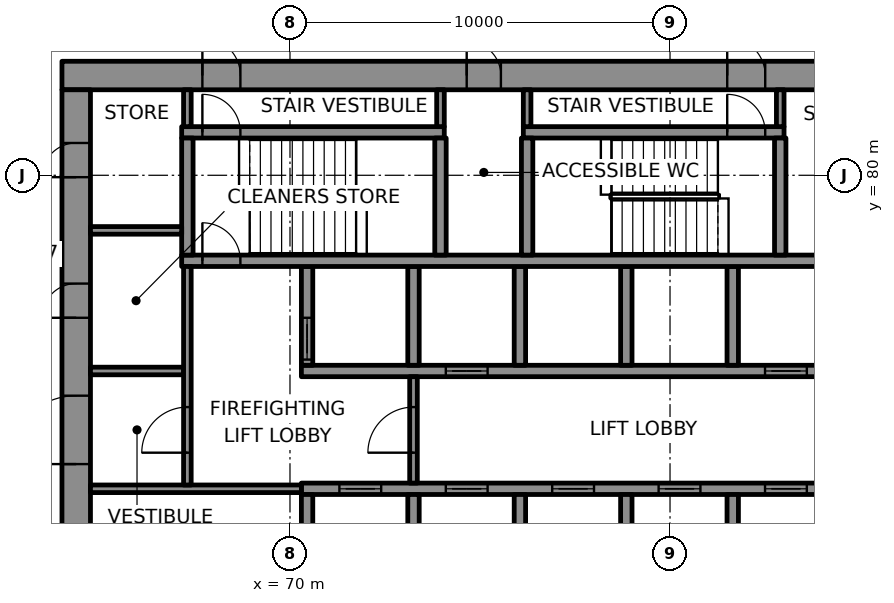
"""IFC4 building model, lengths in metres.
Left out: names, types, materials, properties, quantities, classifications, styles, units other than length and angle.
Written with IfcOpenShell. Run it as: python <this file> out.ifc"""

import sys

from ifc_helpers import new_model, si_unit, direction, frame, frame_2d, origin, place, context, subcontext, project, spatial, rectangle, extrude, element, fill, save


model = new_model("IFC4")
c1 = context("Model", 3, precision=1e-05, world=origin(), true_north=direction((0.0, 1.0)))
c2 = subcontext(c1, "Body", "Model", "MODEL_VIEW")
j1 = project(units=[si_unit("LENGTHUNIT", "METRE"), si_unit("PLANEANGLEUNIT", "RADIAN")], contexts=[c1])
p1 = place(None, origin())
s1 = spatial("IfcSite", under=j1, at=p1, CompositionType="ELEMENT")
p2 = place(p1, origin())
s2 = spatial("IfcBuilding", under=s1, at=p2, CompositionType="ELEMENT")
p3 = place(p2, frame((0.0, 0.0, 194.8)))
s3 = spatial("IfcBuildingStorey", under=s2, at=p3, CompositionType="ELEMENT", Elevation=194.8)
p4 = place(p3, frame((64.0, 82.625, 0.0), z_axis=(0.0, 0.0, 1.0), x_axis=(1.0, 0.0, 0.0)))
e1 = element("IfcWall", 1, at=p4, inside=s3, PredefinedType="SHEAR", context=c2, shape_type="SweptSolid", body=[
    extrude(rectangle(XDim=22.0, YDim=0.75, at=frame_2d((11.0, 0.0))), origin(), (0.0, 0.0, 1.0), 3.7),
])
p5 = place(p4, frame((3.695, 0.0, 0.0)))
e2 = element("IfcOpeningElement", 2, at=p5, cuts=e1, PredefinedType="OPENING", context=c2, shape_type="SweptSolid", body=[
    extrude(rectangle(XDim=1.0, YDim=2.1, at=frame_2d((0.5, 1.05))), frame((0.0, 0.385, 0.0), z_axis=(0.0, -1.0, 0.0), x_axis=(1.0, 0.0, 0.0)), (0.0, 0.0, 1.0), 0.77),
])
p6 = place(p4, frame((17.505, 0.0, 0.0)))
e3 = element("IfcOpeningElement", 3, at=p6, cuts=e1, PredefinedType="OPENING", context=c2, shape_type="SweptSolid", body=[
    extrude(rectangle(XDim=1.0, YDim=2.1, at=frame_2d((0.5, 1.05))), frame((0.0, 0.385, 0.0), z_axis=(0.0, -1.0, 0.0), x_axis=(1.0, 0.0, 0.0)), (0.0, 0.0, 1.0), 0.77),
])
p7 = place(p4, frame((10.65, 0.0, 0.0)))
e4 = element("IfcOpeningElement", 4, at=p7, cuts=e1, PredefinedType="OPENING", context=c2, shape_type="SweptSolid", body=[
    extrude(rectangle(XDim=0.9, YDim=2.1, at=frame_2d((0.45, 1.05))), frame((0.0, 0.385, 0.0), z_axis=(0.0, -1.0, 0.0), x_axis=(1.0, 0.0, 0.0)), (0.0, 0.0, 1.0), 0.77),
])
p8 = place(p3, frame((64.375, 67.75, 0.0), z_axis=(0.0, 0.0, 1.0), x_axis=(0.0, 1.0, 0.0)))
e5 = element("IfcWall", 5, at=p8, inside=s3, PredefinedType="SHEAR", context=c2, shape_type="SweptSolid", body=[
    extrude(rectangle(XDim=14.5, YDim=0.75, at=frame_2d((7.25, 0.0))), origin(), (0.0, 0.0, 1.0), 3.7),
])
p9 = place(p8, frame((4.65, 0.0, 0.0)))
e6 = element("IfcOpeningElement", 6, at=p9, cuts=e5, PredefinedType="OPENING", context=c2, shape_type="SweptSolid", body=[
    extrude(rectangle(XDim=1.8, YDim=2.1, at=frame_2d((0.9, 1.05))), frame((0.0, 0.385, 0.0), z_axis=(0.0, -1.0, 0.0), x_axis=(1.0, 0.0, 0.0)), (0.0, 0.0, 1.0), 0.77),
])
p10 = place(p8, frame((8.5, 0.0, 0.0)))
e7 = element("IfcOpeningElement", 7, at=p10, cuts=e5, PredefinedType="OPENING", context=c2, shape_type="SweptSolid", body=[
    extrude(rectangle(XDim=0.9, YDim=2.1, at=frame_2d((0.45, 1.05))), frame((0.0, 0.385, 0.0), z_axis=(0.0, -1.0, 0.0), x_axis=(1.0, 0.0, 0.0)), (0.0, 0.0, 1.0), 0.77),
])
p11 = place(p8, frame((12.2, 0.0, 0.0)))
e8 = element("IfcOpeningElement", 8, at=p11, cuts=e5, PredefinedType="OPENING", context=c2, shape_type="SweptSolid", body=[
    extrude(rectangle(XDim=0.9, YDim=2.1, at=frame_2d((0.45, 1.05))), frame((0.0, 0.385, 0.0), z_axis=(0.0, -1.0, 0.0), x_axis=(1.0, 0.0, 0.0)), (0.0, 0.0, 1.0), 0.77),
])
p12 = place(p3, frame((70.3, 71.75, 0.0), z_axis=(0.0, 0.0, 1.0), x_axis=(1.0, 0.0, 0.0)))
e9 = element("IfcWall", 9, at=p12, inside=s3, PredefinedType="SHEAR", context=c2, shape_type="SweptSolid", body=[
    extrude(rectangle(XDim=14.3, YDim=0.3, at=frame_2d((7.15, 0.0))), origin(), (0.0, 0.0, 1.0), 3.7),
])
p13 = place(p12, frame((1.0, 0.0, 0.0)))
e10 = element("IfcOpeningElement", 10, at=p13, cuts=e9, PredefinedType="OPENING", context=c2, shape_type="SweptSolid", body=[
    extrude(rectangle(XDim=1.1, YDim=2.1, at=frame_2d((0.55, 1.05))), frame((0.0, 0.16, 0.0), z_axis=(0.0, -1.0, 0.0), x_axis=(1.0, 0.0, 0.0)), (0.0, 0.0, 1.0), 0.32),
])
p14 = place(p12, frame((3.8, 0.0, 0.0)))
e11 = element("IfcOpeningElement", 11, at=p14, cuts=e9, PredefinedType="OPENING", context=c2, shape_type="SweptSolid", body=[
    extrude(rectangle(XDim=1.1, YDim=2.1, at=frame_2d((0.55, 1.05))), frame((0.0, 0.16, 0.0), z_axis=(0.0, -1.0, 0.0), x_axis=(1.0, 0.0, 0.0)), (0.0, 0.0, 1.0), 0.32),
])
p15 = place(p12, frame((6.6, 0.0, 0.0)))
e12 = element("IfcOpeningElement", 12, at=p15, cuts=e9, PredefinedType="OPENING", context=c2, shape_type="SweptSolid", body=[
    extrude(rectangle(XDim=1.1, YDim=2.1, at=frame_2d((0.55, 1.05))), frame((0.0, 0.16, 0.0), z_axis=(0.0, -1.0, 0.0), x_axis=(1.0, 0.0, 0.0)), (0.0, 0.0, 1.0), 0.32),
])
p16 = place(p12, frame((9.4, 0.0, 0.0)))
e13 = element("IfcOpeningElement", 13, at=p16, cuts=e9, PredefinedType="OPENING", context=c2, shape_type="SweptSolid", body=[
    extrude(rectangle(XDim=1.1, YDim=2.1, at=frame_2d((0.55, 1.05))), frame((0.0, 0.16, 0.0), z_axis=(0.0, -1.0, 0.0), x_axis=(1.0, 0.0, 0.0)), (0.0, 0.0, 1.0), 0.32),
])
p17 = place(p12, frame((12.2, 0.0, 0.0)))
e14 = element("IfcOpeningElement", 14, at=p17, cuts=e9, PredefinedType="OPENING", context=c2, shape_type="SweptSolid", body=[
    extrude(rectangle(XDim=1.1, YDim=2.1, at=frame_2d((0.55, 1.05))), frame((0.0, 0.16, 0.0), z_axis=(0.0, -1.0, 0.0), x_axis=(1.0, 0.0, 0.0)), (0.0, 0.0, 1.0), 0.32),
])
p18 = place(p3, frame((70.3, 74.85, 0.0), z_axis=(0.0, 0.0, 1.0), x_axis=(1.0, 0.0, 0.0)))
e15 = element("IfcWall", 15, at=p18, inside=s3, PredefinedType="SHEAR", context=c2, shape_type="SweptSolid", body=[
    extrude(rectangle(XDim=14.3, YDim=0.3, at=frame_2d((7.15, 0.0))), origin(), (0.0, 0.0, 1.0), 3.7),
])
p19 = place(p18, frame((3.8, 0.0, 0.0)))
e16 = element("IfcOpeningElement", 16, at=p19, cuts=e15, PredefinedType="OPENING", context=c2, shape_type="SweptSolid", body=[
    extrude(rectangle(XDim=1.1, YDim=2.1, at=frame_2d((0.55, 1.05))), frame((0.0, 0.16, 0.0), z_axis=(0.0, -1.0, 0.0), x_axis=(1.0, 0.0, 0.0)), (0.0, 0.0, 1.0), 0.32),
])
p20 = place(p18, frame((12.2, 0.0, 0.0)))
e17 = element("IfcOpeningElement", 17, at=p20, cuts=e15, PredefinedType="OPENING", context=c2, shape_type="SweptSolid", body=[
    extrude(rectangle(XDim=1.1, YDim=2.1, at=frame_2d((0.55, 1.05))), frame((0.0, 0.16, 0.0), z_axis=(0.0, -1.0, 0.0), x_axis=(1.0, 0.0, 0.0)), (0.0, 0.0, 1.0), 0.32),
])
p21 = place(p3, frame((70.45, 69.0, 0.0), z_axis=(0.0, 0.0, 1.0), x_axis=(0.0, 1.0, 0.0)))
e18 = element("IfcWall", 18, at=p21, inside=s3, PredefinedType="SHEAR", context=c2, shape_type="SweptSolid", body=[
    extrude(rectangle(XDim=2.6, YDim=0.3, at=frame_2d((1.3, 0.0))), origin(), (0.0, 0.0, 1.0), 3.7),
])
p22 = place(p3, frame((70.45, 75.0, 0.0), z_axis=(0.0, 0.0, 1.0), x_axis=(0.0, 1.0, 0.0)))
e19 = element("IfcWall", 19, at=p22, inside=s3, PredefinedType="SHEAR", context=c2, shape_type="SweptSolid", body=[
    extrude(rectangle(XDim=2.6, YDim=0.3, at=frame_2d((1.3, 0.0))), origin(), (0.0, 0.0, 1.0), 3.7),
])
p23 = place(p22, frame((0.15, 0.0, 0.0)))
e20 = element("IfcOpeningElement", 20, at=p23, cuts=e19, PredefinedType="OPENING", context=c2, shape_type="SweptSolid", body=[
    extrude(rectangle(XDim=1.1, YDim=2.1, at=frame_2d((0.55, 1.05))), frame((0.0, 0.16, 0.0), z_axis=(0.0, -1.0, 0.0), x_axis=(1.0, 0.0, 0.0)), (0.0, 0.0, 1.0), 0.32),
])
for number, where, z_axis, x_axis in (
    (21, (73.25, 69.0, 0.0), (0.0, 0.0, 1.0), (0.0, 1.0, 0.0)),
    (22, (73.25, 75.0, 0.0), (0.0, 0.0, 1.0), (0.0, 1.0, 0.0)),
    (23, (76.05, 69.0, 0.0), (0.0, 0.0, 1.0), (0.0, 1.0, 0.0)),
    (24, (76.05, 75.0, 0.0), (0.0, 0.0, 1.0), (0.0, 1.0, 0.0)),
    (25, (78.85, 69.0, 0.0), (0.0, 0.0, 1.0), (0.0, 1.0, 0.0)),
    (26, (78.85, 75.0, 0.0), (0.0, 0.0, 1.0), (0.0, 1.0, 0.0)),
    (27, (81.65, 69.0, 0.0), (0.0, 0.0, 1.0), (0.0, 1.0, 0.0)),
    (28, (81.65, 75.0, 0.0), (0.0, 0.0, 1.0), (0.0, 1.0, 0.0)),
):
    element("IfcWall", number, at=place(p3, frame(where, z_axis=z_axis, x_axis=x_axis)), inside=s3, PredefinedType="SHEAR", context=c2, shape_type="SweptSolid", body=[
        extrude(rectangle(XDim=2.6, YDim=0.3, at=frame_2d((1.3, 0.0))), origin(), (0.0, 0.0, 1.0), 3.7),
    ])
p24 = place(p3, frame((67.15, 77.75, 0.0), z_axis=(0.0, 0.0, 1.0), x_axis=(1.0, 0.0, 0.0)))
e29 = element("IfcWall", 29, at=p24, inside=s3, PredefinedType="SHEAR", context=c2, shape_type="SweptSolid", body=[
    extrude(rectangle(XDim=17.45, YDim=0.3, at=frame_2d((8.725, 0.0))), origin(), (0.0, 0.0, 1.0), 3.7),
])
p25 = place(p24, frame((0.545, 0.0, 0.0)))
e30 = element("IfcOpeningElement", 30, at=p25, cuts=e29, PredefinedType="OPENING", context=c2, shape_type="SweptSolid", body=[
    extrude(rectangle(XDim=1.0, YDim=2.1, at=frame_2d((0.5, 1.05))), frame((0.0, 0.16, 0.0), z_axis=(0.0, -1.0, 0.0), x_axis=(1.0, 0.0, 0.0)), (0.0, 0.0, 1.0), 0.32),
])
p26 = place(p3, frame((67.15, 81.13, 0.0), z_axis=(0.0, 0.0, 1.0), x_axis=(1.0, 0.0, 0.0)))
e31 = element("IfcWall", 31, at=p26, inside=s3, PredefinedType="SHEAR", context=c2, shape_type="SweptSolid", body=[
    extrude(rectangle(XDim=6.91, YDim=0.3, at=frame_2d((3.455, 0.0))), origin(), (0.0, 0.0, 1.0), 3.7),
])
p27 = place(p26, frame((0.545, 0.0, 0.0)))
e32 = element("IfcOpeningElement", 32, at=p27, cuts=e31, PredefinedType="OPENING", context=c2, shape_type="SweptSolid", body=[
    extrude(rectangle(XDim=1.0, YDim=2.1, at=frame_2d((0.5, 1.05))), frame((0.0, 0.16, 0.0), z_axis=(0.0, -1.0, 0.0), x_axis=(1.0, 0.0, 0.0)), (0.0, 0.0, 1.0), 0.32),
])
p28 = place(p3, frame((76.14, 81.13, 0.0), z_axis=(0.0, 0.0, 1.0), x_axis=(1.0, 0.0, 0.0)))
e33 = element("IfcWall", 33, at=p28, inside=s3, PredefinedType="SHEAR", context=c2, shape_type="SweptSolid", body=[
    extrude(rectangle(XDim=6.86, YDim=0.3, at=frame_2d((3.43, 0.0))), origin(), (0.0, 0.0, 1.0), 3.7),
])
p29 = place(p28, frame((5.365, 0.0, 0.0)))
e34 = element("IfcOpeningElement", 34, at=p29, cuts=e33, PredefinedType="OPENING", context=c2, shape_type="SweptSolid", body=[
    extrude(rectangle(XDim=1.0, YDim=2.1, at=frame_2d((0.5, 1.05))), frame((0.0, 0.16, 0.0), z_axis=(0.0, -1.0, 0.0), x_axis=(1.0, 0.0, 0.0)), (0.0, 0.0, 1.0), 0.32),
])
for number, where, z_axis, x_axis in (
    (35, (67.3, 77.9, 0.0), (0.0, 0.0, 1.0), (0.0, 1.0, 0.0)),
    (36, (73.96, 77.9, 0.0), (0.0, 0.0, 1.0), (0.0, 1.0, 0.0)),
    (37, (76.24, 77.9, 0.0), (0.0, 0.0, 1.0), (0.0, 1.0, 0.0)),
    (38, (82.9, 77.9, 0.0), (0.0, 0.0, 1.0), (0.0, 1.0, 0.0)),
):
    element("IfcWall", number, at=place(p3, frame(where, z_axis=z_axis, x_axis=x_axis)), inside=s3, PredefinedType="SHEAR", context=c2, shape_type="SweptSolid", body=[
        extrude(rectangle(XDim=3.08, YDim=0.3, at=frame_2d((1.54, 0.0))), origin(), (0.0, 0.0, 1.0), 3.7),
    ])
p30 = place(p3, frame((64.75, 71.75, 0.0), z_axis=(0.0, 0.0, 1.0), x_axis=(1.0, 0.0, 0.0)))
e39 = element("IfcWall", 39, at=p30, inside=s3, PredefinedType="PARTITIONING", context=c2, shape_type="SweptSolid", body=[
    extrude(rectangle(XDim=5.55, YDim=0.2, at=frame_2d((2.775, 0.0))), origin(), (0.0, 0.0, 1.0), 3.7),
])
p31 = place(p3, frame((64.75, 74.85, 0.0), z_axis=(0.0, 0.0, 1.0), x_axis=(1.0, 0.0, 0.0)))
e40 = element("IfcWall", 40, at=p31, inside=s3, PredefinedType="PARTITIONING", context=c2, shape_type="SweptSolid", body=[
    extrude(rectangle(XDim=2.45, YDim=0.2, at=frame_2d((1.225, 0.0))), origin(), (0.0, 0.0, 1.0), 3.7),
])
p32 = place(p3, frame((64.75, 78.55, 0.0), z_axis=(0.0, 0.0, 1.0), x_axis=(1.0, 0.0, 0.0)))
e41 = element("IfcWall", 41, at=p32, inside=s3, PredefinedType="PARTITIONING", context=c2, shape_type="SweptSolid", body=[
    extrude(rectangle(XDim=2.4, YDim=0.2, at=frame_2d((1.2, 0.0))), origin(), (0.0, 0.0, 1.0), 3.7),
])
p33 = place(p3, frame((67.3, 71.85, 0.0), z_axis=(0.0, 0.0, 1.0), x_axis=(0.0, 1.0, 0.0)))
e42 = element("IfcWall", 42, at=p33, inside=s3, PredefinedType="PARTITIONING", context=c2, shape_type="SweptSolid", body=[
    extrude(rectangle(XDim=5.75, YDim=0.2, at=frame_2d((2.875, 0.0))), origin(), (0.0, 0.0, 1.0), 3.7),
])
p34 = place(p33, frame((0.85, 0.0, 0.0)))
e43 = element("IfcOpeningElement", 43, at=p34, cuts=e42, PredefinedType="OPENING", context=c2, shape_type="SweptSolid", body=[
    extrude(rectangle(XDim=1.2, YDim=2.1, at=frame_2d((0.6, 1.05))), frame((0.0, 0.11, 0.0), z_axis=(0.0, -1.0, 0.0), x_axis=(1.0, 0.0, 0.0)), (0.0, 0.0, 1.0), 0.22),
])
p35 = place(p3, frame((67.3, 81.28, 0.0), z_axis=(0.0, 0.0, 1.0), x_axis=(0.0, 1.0, 0.0)))
e44 = element("IfcWall", 44, at=p35, inside=s3, PredefinedType="PARTITIONING", context=c2, shape_type="SweptSolid", body=[
    extrude(rectangle(XDim=0.97, YDim=0.2, at=frame_2d((0.485, 0.0))), origin(), (0.0, 0.0, 1.0), 3.7),
])
p36 = place(p3, frame((73.25, 71.9, 0.0), z_axis=(0.0, 0.0, 1.0), x_axis=(0.0, 1.0, 0.0)))
e45 = element("IfcWall", 45, at=p36, inside=s3, PredefinedType="PARTITIONING", context=c2, shape_type="SweptSolid", body=[
    extrude(rectangle(XDim=2.8, YDim=0.2, at=frame_2d((1.4, 0.0))), origin(), (0.0, 0.0, 1.0), 3.7),
])
p37 = place(p36, frame((0.8, 0.0, 0.0)))
e46 = element("IfcOpeningElement", 46, at=p37, cuts=e45, PredefinedType="OPENING", context=c2, shape_type="SweptSolid", body=[
    extrude(rectangle(XDim=1.2, YDim=2.1, at=frame_2d((0.6, 1.05))), frame((0.0, 0.11, 0.0), z_axis=(0.0, -1.0, 0.0), x_axis=(1.0, 0.0, 0.0)), (0.0, 0.0, 1.0), 0.22),
])
for number, where, z_axis, x_axis in (
    (47, (73.96, 81.28, 0.0), (0.0, 0.0, 1.0), (0.0, 1.0, 0.0)),
    (48, (76.24, 81.28, 0.0), (0.0, 0.0, 1.0), (0.0, 1.0, 0.0)),
    (49, (82.9, 81.28, 0.0), (0.0, 0.0, 1.0), (0.0, 1.0, 0.0)),
):
    element("IfcWall", number, at=place(p3, frame(where, z_axis=z_axis, x_axis=x_axis)), inside=s3, PredefinedType="PARTITIONING", context=c2, shape_type="SweptSolid", body=[
        extrude(rectangle(XDim=0.97, YDim=0.2, at=frame_2d((0.485, 0.0))), origin(), (0.0, 0.0, 1.0), 3.7),
    ])
p38 = place(p13, origin())
e50 = element("IfcDoor", 50, at=p38, inside=s3, OperationType="DOUBLE_DOOR_SLIDING", PredefinedType="DOOR", context=c2, shape_type="SweptSolid", body=[
    extrude(rectangle(XDim=1.1, YDim=2.1, at=frame_2d((0.55, 1.05))), frame((0.0, 0.025, 0.0), z_axis=(0.0, -1.0, 0.0), x_axis=(1.0, 0.0, 0.0)), (0.0, 0.0, 1.0), 0.05),
])
fill(e10, e50)
p39 = place(p14, origin())
e51 = element("IfcDoor", 51, at=p39, inside=s3, OperationType="DOUBLE_DOOR_SLIDING", PredefinedType="DOOR", context=c2, shape_type="SweptSolid", body=[
    extrude(rectangle(XDim=1.1, YDim=2.1, at=frame_2d((0.55, 1.05))), frame((0.0, 0.025, 0.0), z_axis=(0.0, -1.0, 0.0), x_axis=(1.0, 0.0, 0.0)), (0.0, 0.0, 1.0), 0.05),
])
fill(e11, e51)
p40 = place(p15, origin())
e52 = element("IfcDoor", 52, at=p40, inside=s3, OperationType="DOUBLE_DOOR_SLIDING", PredefinedType="DOOR", context=c2, shape_type="SweptSolid", body=[
    extrude(rectangle(XDim=1.1, YDim=2.1, at=frame_2d((0.55, 1.05))), frame((0.0, 0.025, 0.0), z_axis=(0.0, -1.0, 0.0), x_axis=(1.0, 0.0, 0.0)), (0.0, 0.0, 1.0), 0.05),
])
fill(e12, e52)
p41 = place(p16, origin())
e53 = element("IfcDoor", 53, at=p41, inside=s3, OperationType="DOUBLE_DOOR_SLIDING", PredefinedType="DOOR", context=c2, shape_type="SweptSolid", body=[
    extrude(rectangle(XDim=1.1, YDim=2.1, at=frame_2d((0.55, 1.05))), frame((0.0, 0.025, 0.0), z_axis=(0.0, -1.0, 0.0), x_axis=(1.0, 0.0, 0.0)), (0.0, 0.0, 1.0), 0.05),
])
fill(e13, e53)
p42 = place(p17, origin())
e54 = element("IfcDoor", 54, at=p42, inside=s3, OperationType="DOUBLE_DOOR_SLIDING", PredefinedType="DOOR", context=c2, shape_type="SweptSolid", body=[
    extrude(rectangle(XDim=1.1, YDim=2.1, at=frame_2d((0.55, 1.05))), frame((0.0, 0.025, 0.0), z_axis=(0.0, -1.0, 0.0), x_axis=(1.0, 0.0, 0.0)), (0.0, 0.0, 1.0), 0.05),
])
fill(e14, e54)
p43 = place(p23, origin())
e55 = element("IfcDoor", 55, at=p43, inside=s3, OperationType="DOUBLE_DOOR_SLIDING", PredefinedType="DOOR", context=c2, shape_type="SweptSolid", body=[
    extrude(rectangle(XDim=1.1, YDim=2.1, at=frame_2d((0.55, 1.05))), frame((0.0, 0.025, 0.0), z_axis=(0.0, -1.0, 0.0), x_axis=(1.0, 0.0, 0.0)), (0.0, 0.0, 1.0), 0.05),
])
fill(e20, e55)
p44 = place(p19, origin())
e56 = element("IfcDoor", 56, at=p44, inside=s3, OperationType="DOUBLE_DOOR_SLIDING", PredefinedType="DOOR", context=c2, shape_type="SweptSolid", body=[
    extrude(rectangle(XDim=1.1, YDim=2.1, at=frame_2d((0.55, 1.05))), frame((0.0, 0.025, 0.0), z_axis=(0.0, -1.0, 0.0), x_axis=(1.0, 0.0, 0.0)), (0.0, 0.0, 1.0), 0.05),
])
fill(e16, e56)
p45 = place(p20, origin())
e57 = element("IfcDoor", 57, at=p45, inside=s3, OperationType="DOUBLE_DOOR_SLIDING", PredefinedType="DOOR", context=c2, shape_type="SweptSolid", body=[
    extrude(rectangle(XDim=1.1, YDim=2.1, at=frame_2d((0.55, 1.05))), frame((0.0, 0.025, 0.0), z_axis=(0.0, -1.0, 0.0), x_axis=(1.0, 0.0, 0.0)), (0.0, 0.0, 1.0), 0.05),
])
fill(e17, e57)
p46 = place(p25, origin())
e58 = element("IfcDoor", 58, at=p46, inside=s3, OperationType="SINGLE_SWING_LEFT", PredefinedType="DOOR", context=c2, shape_type="SweptSolid", body=[
    extrude(rectangle(XDim=1.0, YDim=2.1, at=frame_2d((0.5, 1.05))), frame((0.0, 0.025, 0.0), z_axis=(0.0, -1.0, 0.0), x_axis=(1.0, 0.0, 0.0)), (0.0, 0.0, 1.0), 0.05),
])
fill(e30, e58)
p47 = place(p27, origin())
e59 = element("IfcDoor", 59, at=p47, inside=s3, OperationType="SINGLE_SWING_RIGHT", PredefinedType="DOOR", context=c2, shape_type="SweptSolid", body=[
    extrude(rectangle(XDim=1.0, YDim=2.1, at=frame_2d((0.5, 1.05))), frame((0.0, 0.025, 0.0), z_axis=(0.0, -1.0, 0.0), x_axis=(1.0, 0.0, 0.0)), (0.0, 0.0, 1.0), 0.05),
])
fill(e32, e59)
p48 = place(p5, origin())
e60 = element("IfcDoor", 60, at=p48, inside=s3, OperationType="SINGLE_SWING_LEFT", PredefinedType="DOOR", context=c2, shape_type="SweptSolid", body=[
    extrude(rectangle(XDim=1.0, YDim=2.1, at=frame_2d((0.5, 1.05))), frame((0.0, 0.095, 0.0), z_axis=(0.0, -1.0, 0.0), x_axis=(1.0, 0.0, 0.0)), (0.0, 0.0, 1.0), 0.19),
])
fill(e2, e60)
p49 = place(p29, origin())
e61 = element("IfcDoor", 61, at=p49, inside=s3, OperationType="SINGLE_SWING_RIGHT", PredefinedType="DOOR", context=c2, shape_type="SweptSolid", body=[
    extrude(rectangle(XDim=1.0, YDim=2.1, at=frame_2d((0.5, 1.05))), frame((0.0, 0.025, 0.0), z_axis=(0.0, -1.0, 0.0), x_axis=(1.0, 0.0, 0.0)), (0.0, 0.0, 1.0), 0.05),
])
fill(e34, e61)
p50 = place(p6, origin())
e62 = element("IfcDoor", 62, at=p50, inside=s3, OperationType="SINGLE_SWING_LEFT", PredefinedType="DOOR", context=c2, shape_type="SweptSolid", body=[
    extrude(rectangle(XDim=1.0, YDim=2.1, at=frame_2d((0.5, 1.05))), frame((0.0, 0.095, 0.0), z_axis=(0.0, -1.0, 0.0), x_axis=(1.0, 0.0, 0.0)), (0.0, 0.0, 1.0), 0.19),
])
fill(e3, e62)
p51 = place(p37, origin())
e63 = element("IfcDoor", 63, at=p51, inside=s3, OperationType="SINGLE_SWING_LEFT", PredefinedType="DOOR", context=c2, shape_type="SweptSolid", body=[
    extrude(rectangle(XDim=1.2, YDim=2.1, at=frame_2d((0.6, 1.05))), frame((0.0, 0.025, 0.0), z_axis=(0.0, -1.0, 0.0), x_axis=(1.0, 0.0, 0.0)), (0.0, 0.0, 1.0), 0.05),
])
fill(e46, e63)
p52 = place(p34, origin())
e64 = element("IfcDoor", 64, at=p52, inside=s3, OperationType="SINGLE_SWING_RIGHT", PredefinedType="DOOR", context=c2, shape_type="SweptSolid", body=[
    extrude(rectangle(XDim=1.2, YDim=2.1, at=frame_2d((0.6, 1.05))), frame((0.0, 0.025, 0.0), z_axis=(0.0, -1.0, 0.0), x_axis=(1.0, 0.0, 0.0)), (0.0, 0.0, 1.0), 0.05),
])
fill(e43, e64)
p53 = place(p9, origin())
e65 = element("IfcDoor", 65, at=p53, inside=s3, OperationType="SINGLE_SWING_LEFT", PredefinedType="DOOR", context=c2, shape_type="SweptSolid", body=[
    extrude(rectangle(XDim=1.8, YDim=2.1, at=frame_2d((0.9, 1.05))), frame((0.0, 0.095, 0.0), z_axis=(0.0, -1.0, 0.0), x_axis=(1.0, 0.0, 0.0)), (0.0, 0.0, 1.0), 0.19),
])
fill(e6, e65)
p54 = place(p10, origin())
e66 = element("IfcDoor", 66, at=p54, inside=s3, OperationType="SINGLE_SWING_RIGHT", PredefinedType="DOOR", context=c2, shape_type="SweptSolid", body=[
    extrude(rectangle(XDim=0.9, YDim=2.1, at=frame_2d((0.45, 1.05))), frame((0.0, 0.095, 0.0), z_axis=(0.0, -1.0, 0.0), x_axis=(1.0, 0.0, 0.0)), (0.0, 0.0, 1.0), 0.19),
])
fill(e7, e66)
p55 = place(p11, origin())
e67 = element("IfcDoor", 67, at=p55, inside=s3, OperationType="SINGLE_SWING_LEFT", PredefinedType="DOOR", context=c2, shape_type="SweptSolid", body=[
    extrude(rectangle(XDim=0.9, YDim=2.1, at=frame_2d((0.45, 1.05))), frame((0.0, 0.095, 0.0), z_axis=(0.0, -1.0, 0.0), x_axis=(1.0, 0.0, 0.0)), (0.0, 0.0, 1.0), 0.19),
])
fill(e8, e67)
p56 = place(p7, origin())
e68 = element("IfcDoor", 68, at=p56, inside=s3, OperationType="SINGLE_SWING_RIGHT", PredefinedType="DOOR", context=c2, shape_type="SweptSolid", body=[
    extrude(rectangle(XDim=0.9, YDim=2.1, at=frame_2d((0.45, 1.05))), frame((0.0, 0.095, 0.0), z_axis=(0.0, -1.0, 0.0), x_axis=(1.0, 0.0, 0.0)), (0.0, 0.0, 1.0), 0.19),
])
fill(e4, e68)
save(model, sys.argv[1])
